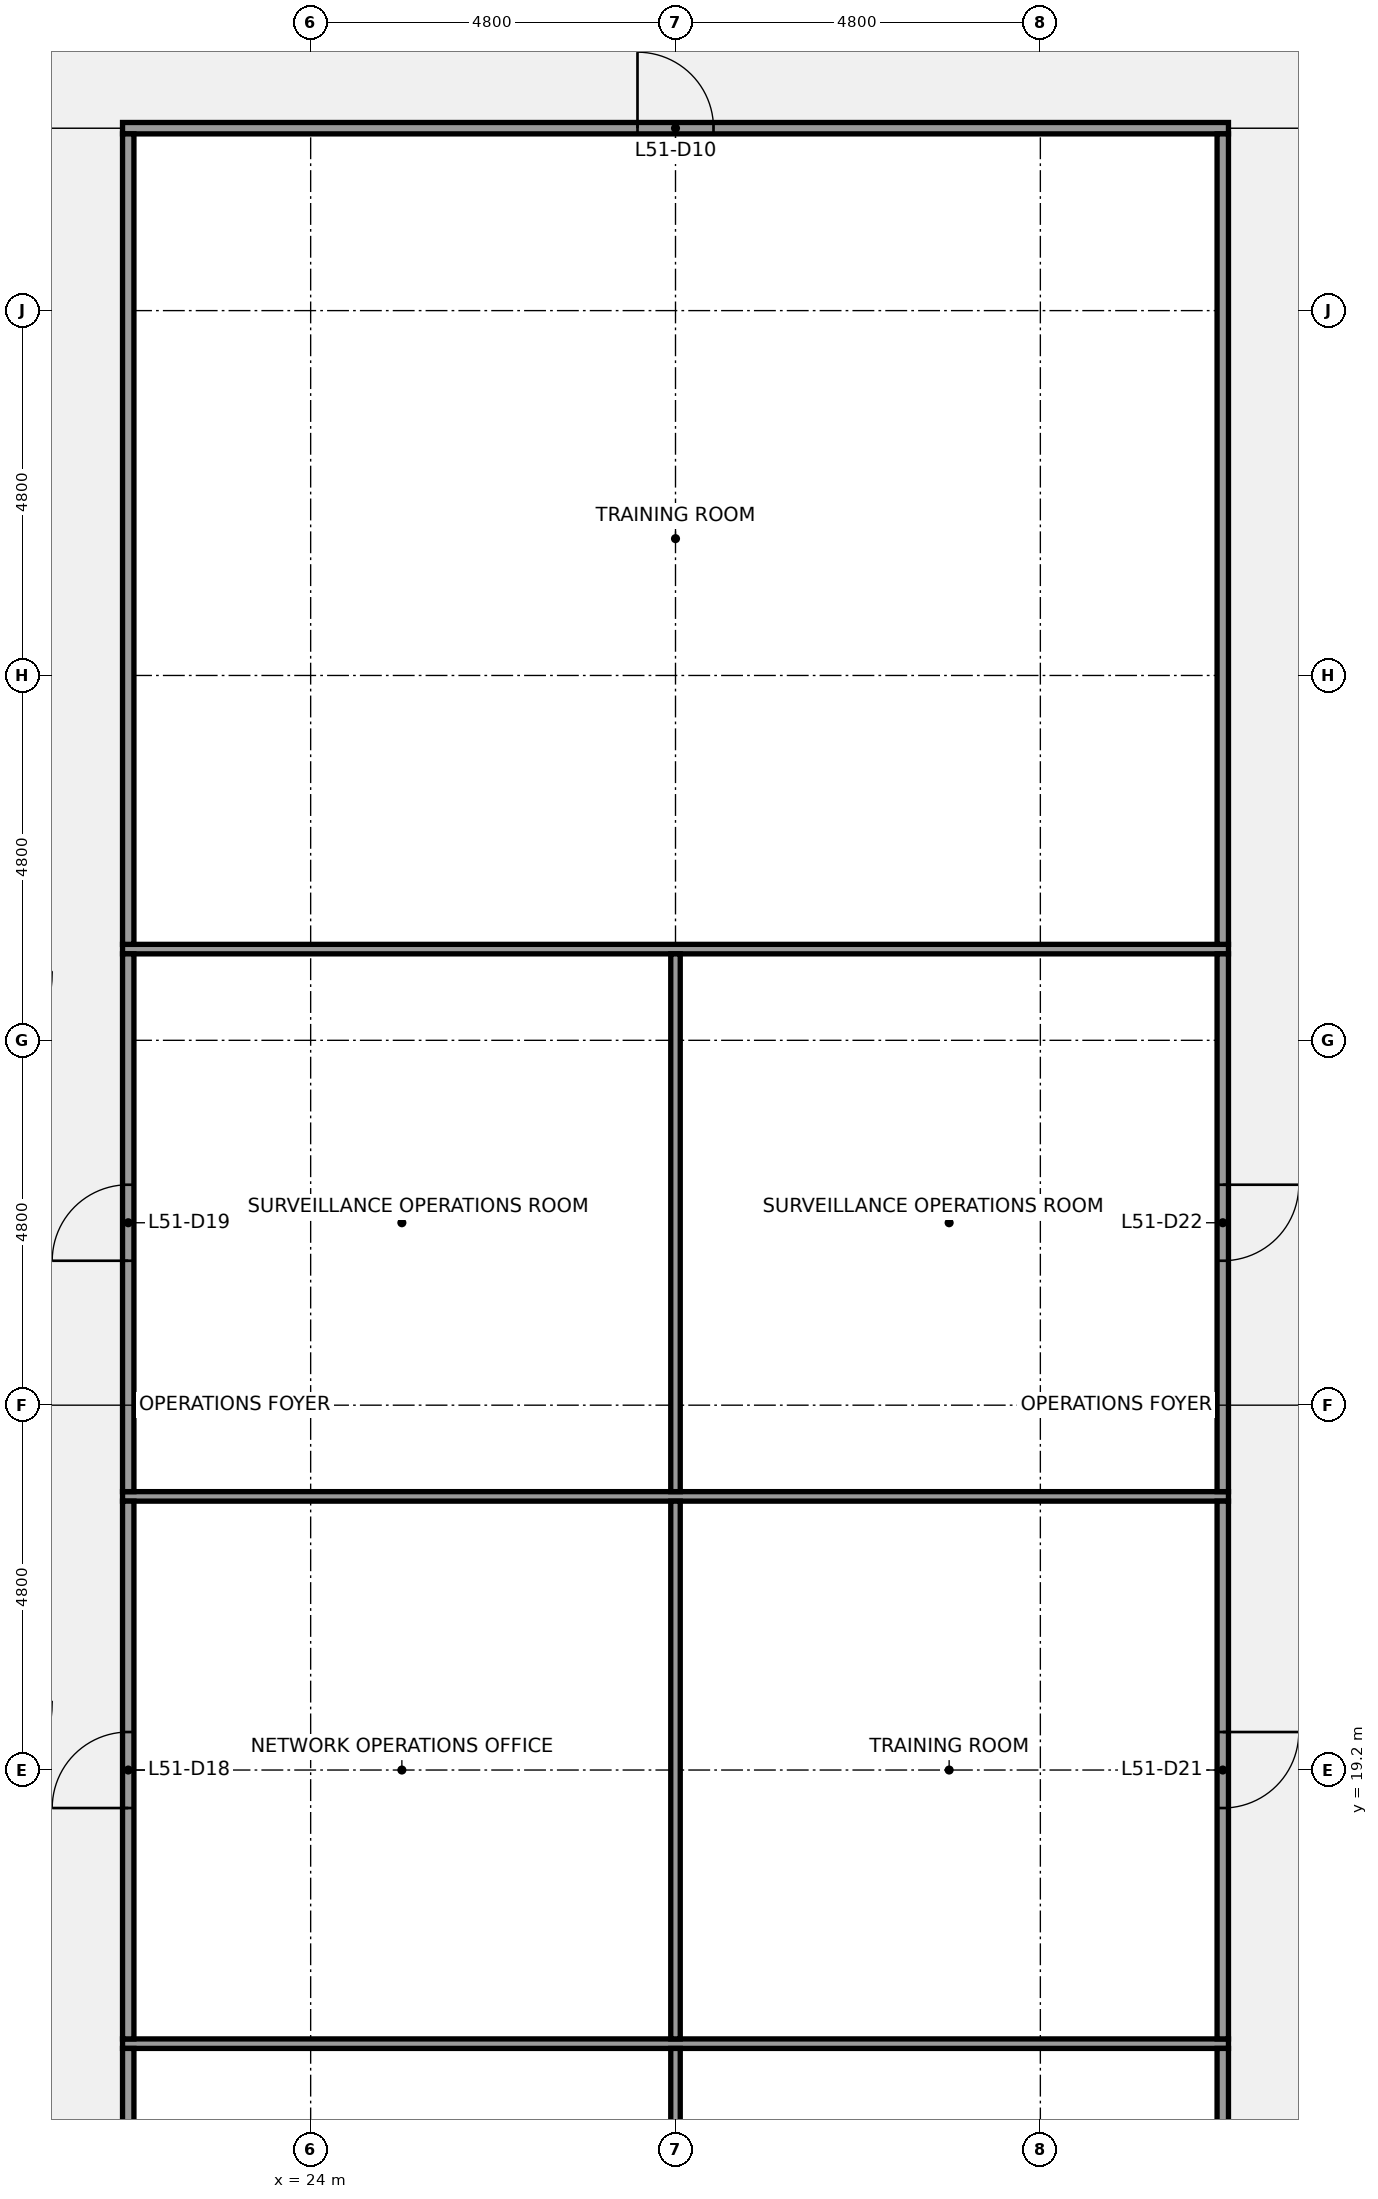
"""IFC4 building model, lengths in metres.
Left out: names, types, materials, properties, quantities, classifications, styles, units other than length and angle.
Written with IfcOpenShell. Run it as: python <this file> out.ifc"""

import sys

from ifc_helpers import new_model, si_unit, direction, frame, frame_2d, origin, place, context, subcontext, project, spatial, rectangle, extrude, element, fill, save


model = new_model("IFC4")
c1 = context("Model", 3, precision=1e-05, world=origin(), true_north=direction((0.0, 1.0)))
c2 = subcontext(c1, "Body", "Model", "MODEL_VIEW")
j1 = project(units=[si_unit("LENGTHUNIT", "METRE"), si_unit("PLANEANGLEUNIT", "RADIAN")], contexts=[c1])
p1 = place(None, origin())
s1 = spatial("IfcSite", under=j1, at=p1, CompositionType="ELEMENT")
p2 = place(p1, origin())
s2 = spatial("IfcBuilding", under=s1, at=p2, CompositionType="ELEMENT")
p3 = place(p2, frame((0.0, 0.0, 233.2)))
s3 = spatial("IfcBuildingStorey", under=s2, at=p3, CompositionType="ELEMENT", Elevation=233.2)
for number, where, z_axis, x_axis in (
    (1, (21.525, 15.6, 0.0), (0.0, 0.0, 1.0), (1.0, 0.0, 0.0)),
    (2, (21.525, 22.8, 0.0), (0.0, 0.0, 1.0), (1.0, 0.0, 0.0)),
    (3, (21.525, 30.0, 0.0), (0.0, 0.0, 1.0), (1.0, 0.0, 0.0)),
):
    element("IfcWall", number, at=place(p3, frame(where, z_axis=z_axis, x_axis=x_axis)), inside=s3, PredefinedType="PARTITIONING", context=c2, shape_type="SweptSolid", body=[
        extrude(rectangle(XDim=14.55, YDim=0.125, at=frame_2d((7.275, 0.0))), origin(), (0.0, 0.0, 1.0), 2.87),
    ])
p4 = place(p3, frame((21.525, 40.8, 0.0), z_axis=(0.0, 0.0, 1.0), x_axis=(1.0, 0.0, 0.0)))
e4 = element("IfcWall", 4, at=p4, inside=s3, PredefinedType="PARTITIONING", context=c2, shape_type="SweptSolid", body=[
    extrude(rectangle(XDim=14.55, YDim=0.15, at=frame_2d((7.275, 0.0))), origin(), (0.0, 0.0, 1.0), 2.87),
])
p5 = place(p4, frame((6.775, 0.0, 0.0)))
e5 = element("IfcOpeningElement", 5, at=p5, cuts=e4, PredefinedType="OPENING", context=c2, shape_type="SweptSolid", body=[
    extrude(rectangle(XDim=1.0, YDim=2.1, at=frame_2d((0.5, 1.05))), frame((0.0, 0.085, 0.0), z_axis=(0.0, -1.0, 0.0), x_axis=(1.0, 0.0, 0.0)), (0.0, 0.0, 1.0), 0.17),
])
p6 = place(p3, frame((21.6, 8.462, 0.0), z_axis=(0.0, 0.0, 1.0), x_axis=(0.0, 1.0, 0.0)))
e6 = element("IfcWall", 6, at=p6, inside=s3, PredefinedType="PARTITIONING", context=c2, shape_type="SweptSolid", body=[
    extrude(rectangle(XDim=7.075, YDim=0.15, at=frame_2d((3.538, 0.0))), origin(), (0.0, 0.0, 1.0), 2.87),
])
p7 = place(p6, frame((3.038, 0.0, 0.0)))
e7 = element("IfcOpeningElement", 7, at=p7, cuts=e6, PredefinedType="OPENING", context=c2, shape_type="SweptSolid", body=[
    extrude(rectangle(XDim=1.0, YDim=2.1, at=frame_2d((0.5, 1.05))), frame((0.0, 0.085, 0.0), z_axis=(0.0, -1.0, 0.0), x_axis=(1.0, 0.0, 0.0)), (0.0, 0.0, 1.0), 0.17),
])
p8 = place(p3, frame((21.6, 15.663, 0.0), z_axis=(0.0, 0.0, 1.0), x_axis=(0.0, 1.0, 0.0)))
e8 = element("IfcWall", 8, at=p8, inside=s3, PredefinedType="PARTITIONING", context=c2, shape_type="SweptSolid", body=[
    extrude(rectangle(XDim=7.075, YDim=0.15, at=frame_2d((3.538, 0.0))), origin(), (0.0, 0.0, 1.0), 2.87),
])
p9 = place(p8, frame((3.038, 0.0, 0.0)))
e9 = element("IfcOpeningElement", 9, at=p9, cuts=e8, PredefinedType="OPENING", context=c2, shape_type="SweptSolid", body=[
    extrude(rectangle(XDim=1.0, YDim=2.1, at=frame_2d((0.5, 1.05))), frame((0.0, 0.085, 0.0), z_axis=(0.0, -1.0, 0.0), x_axis=(1.0, 0.0, 0.0)), (0.0, 0.0, 1.0), 0.17),
])
p10 = place(p3, frame((21.6, 22.863, 0.0), z_axis=(0.0, 0.0, 1.0), x_axis=(0.0, 1.0, 0.0)))
e10 = element("IfcWall", 10, at=p10, inside=s3, PredefinedType="PARTITIONING", context=c2, shape_type="SweptSolid", body=[
    extrude(rectangle(XDim=7.075, YDim=0.15, at=frame_2d((3.538, 0.0))), origin(), (0.0, 0.0, 1.0), 2.87),
])
p11 = place(p10, frame((3.038, 0.0, 0.0)))
e11 = element("IfcOpeningElement", 11, at=p11, cuts=e10, PredefinedType="OPENING", context=c2, shape_type="SweptSolid", body=[
    extrude(rectangle(XDim=1.0, YDim=2.1, at=frame_2d((0.5, 1.05))), frame((0.0, 0.085, 0.0), z_axis=(0.0, -1.0, 0.0), x_axis=(1.0, 0.0, 0.0)), (0.0, 0.0, 1.0), 0.17),
])
p12 = place(p3, frame((21.6, 30.062, 0.0), z_axis=(0.0, 0.0, 1.0), x_axis=(0.0, 1.0, 0.0)))
e12 = element("IfcWall", 12, at=p12, inside=s3, PredefinedType="PARTITIONING", context=c2, shape_type="SweptSolid", body=[
    extrude(rectangle(XDim=10.663, YDim=0.15, at=frame_2d((5.331, 0.0))), origin(), (0.0, 0.0, 1.0), 2.87),
])
p13 = place(p3, frame((28.8, 8.462, 0.0), z_axis=(0.0, 0.0, 1.0), x_axis=(0.0, 1.0, 0.0)))
e13 = element("IfcWall", 13, at=p13, inside=s3, PredefinedType="PARTITIONING", context=c2, shape_type="SweptSolid", body=[
    extrude(rectangle(XDim=7.075, YDim=0.125, at=frame_2d((3.538, 0.0))), origin(), (0.0, 0.0, 1.0), 2.87),
])
for number, where, z_axis, x_axis in (
    (14, (28.8, 15.663, 0.0), (0.0, 0.0, 1.0), (0.0, 1.0, 0.0)),
    (15, (28.8, 22.863, 0.0), (0.0, 0.0, 1.0), (0.0, 1.0, 0.0)),
):
    element("IfcWall", number, at=place(p3, frame(where, z_axis=z_axis, x_axis=x_axis)), inside=s3, PredefinedType="PARTITIONING", context=c2, shape_type="SweptSolid", body=[
        extrude(rectangle(XDim=7.075, YDim=0.125, at=frame_2d((3.538, 0.0))), origin(), (0.0, 0.0, 1.0), 2.87),
    ])
p14 = place(p3, frame((36.0, 8.462, 0.0), z_axis=(0.0, 0.0, 1.0), x_axis=(0.0, 1.0, 0.0)))
e16 = element("IfcWall", 16, at=p14, inside=s3, PredefinedType="PARTITIONING", context=c2, shape_type="SweptSolid", body=[
    extrude(rectangle(XDim=7.075, YDim=0.15, at=frame_2d((3.538, 0.0))), origin(), (0.0, 0.0, 1.0), 2.87),
])
p15 = place(p14, frame((3.038, 0.0, 0.0)))
e17 = element("IfcOpeningElement", 17, at=p15, cuts=e16, PredefinedType="OPENING", context=c2, shape_type="SweptSolid", body=[
    extrude(rectangle(XDim=1.0, YDim=2.1, at=frame_2d((0.5, 1.05))), frame((0.0, 0.085, 0.0), z_axis=(0.0, -1.0, 0.0), x_axis=(1.0, 0.0, 0.0)), (0.0, 0.0, 1.0), 0.17),
])
p16 = place(p3, frame((36.0, 15.663, 0.0), z_axis=(0.0, 0.0, 1.0), x_axis=(0.0, 1.0, 0.0)))
e18 = element("IfcWall", 18, at=p16, inside=s3, PredefinedType="PARTITIONING", context=c2, shape_type="SweptSolid", body=[
    extrude(rectangle(XDim=7.075, YDim=0.15, at=frame_2d((3.538, 0.0))), origin(), (0.0, 0.0, 1.0), 2.87),
])
p17 = place(p16, frame((3.038, 0.0, 0.0)))
e19 = element("IfcOpeningElement", 19, at=p17, cuts=e18, PredefinedType="OPENING", context=c2, shape_type="SweptSolid", body=[
    extrude(rectangle(XDim=1.0, YDim=2.1, at=frame_2d((0.5, 1.05))), frame((0.0, 0.085, 0.0), z_axis=(0.0, -1.0, 0.0), x_axis=(1.0, 0.0, 0.0)), (0.0, 0.0, 1.0), 0.17),
])
p18 = place(p3, frame((36.0, 22.863, 0.0), z_axis=(0.0, 0.0, 1.0), x_axis=(0.0, 1.0, 0.0)))
e20 = element("IfcWall", 20, at=p18, inside=s3, PredefinedType="PARTITIONING", context=c2, shape_type="SweptSolid", body=[
    extrude(rectangle(XDim=7.075, YDim=0.15, at=frame_2d((3.538, 0.0))), origin(), (0.0, 0.0, 1.0), 2.87),
])
p19 = place(p18, frame((3.038, 0.0, 0.0)))
e21 = element("IfcOpeningElement", 21, at=p19, cuts=e20, PredefinedType="OPENING", context=c2, shape_type="SweptSolid", body=[
    extrude(rectangle(XDim=1.0, YDim=2.1, at=frame_2d((0.5, 1.05))), frame((0.0, 0.085, 0.0), z_axis=(0.0, -1.0, 0.0), x_axis=(1.0, 0.0, 0.0)), (0.0, 0.0, 1.0), 0.17),
])
p20 = place(p3, frame((36.0, 30.062, 0.0), z_axis=(0.0, 0.0, 1.0), x_axis=(0.0, 1.0, 0.0)))
e22 = element("IfcWall", 22, at=p20, inside=s3, PredefinedType="PARTITIONING", context=c2, shape_type="SweptSolid", body=[
    extrude(rectangle(XDim=10.663, YDim=0.15, at=frame_2d((5.331, 0.0))), origin(), (0.0, 0.0, 1.0), 2.87),
])
p21 = place(p5, origin())
e23 = element("IfcDoor", 23, at=p21, inside=s3, OperationType="SINGLE_SWING_LEFT", PredefinedType="DOOR", context=c2, shape_type="SweptSolid", body=[
    extrude(rectangle(XDim=1.0, YDim=2.1, at=frame_2d((0.5, 1.05))), frame((0.0, 0.025, 0.0), z_axis=(0.0, -1.0, 0.0), x_axis=(1.0, 0.0, 0.0)), (0.0, 0.0, 1.0), 0.05),
])
fill(e5, e23)
p22 = place(p9, origin())
e24 = element("IfcDoor", 24, at=p22, inside=s3, OperationType="SINGLE_SWING_LEFT", PredefinedType="DOOR", context=c2, shape_type="SweptSolid", body=[
    extrude(rectangle(XDim=1.0, YDim=2.1, at=frame_2d((0.5, 1.05))), frame((0.0, 0.025, 0.0), z_axis=(0.0, -1.0, 0.0), x_axis=(1.0, 0.0, 0.0)), (0.0, 0.0, 1.0), 0.05),
])
fill(e9, e24)
p23 = place(p11, origin())
e25 = element("IfcDoor", 25, at=p23, inside=s3, OperationType="SINGLE_SWING_LEFT", PredefinedType="DOOR", context=c2, shape_type="SweptSolid", body=[
    extrude(rectangle(XDim=1.0, YDim=2.1, at=frame_2d((0.5, 1.05))), frame((0.0, 0.025, 0.0), z_axis=(0.0, -1.0, 0.0), x_axis=(1.0, 0.0, 0.0)), (0.0, 0.0, 1.0), 0.05),
])
fill(e11, e25)
p24 = place(p17, origin())
e26 = element("IfcDoor", 26, at=p24, inside=s3, OperationType="SINGLE_SWING_RIGHT", PredefinedType="DOOR", context=c2, shape_type="SweptSolid", body=[
    extrude(rectangle(XDim=1.0, YDim=2.1, at=frame_2d((0.5, 1.05))), frame((0.0, 0.025, 0.0), z_axis=(0.0, -1.0, 0.0), x_axis=(1.0, 0.0, 0.0)), (0.0, 0.0, 1.0), 0.05),
])
fill(e19, e26)
p25 = place(p19, origin())
e27 = element("IfcDoor", 27, at=p25, inside=s3, OperationType="SINGLE_SWING_RIGHT", PredefinedType="DOOR", context=c2, shape_type="SweptSolid", body=[
    extrude(rectangle(XDim=1.0, YDim=2.1, at=frame_2d((0.5, 1.05))), frame((0.0, 0.025, 0.0), z_axis=(0.0, -1.0, 0.0), x_axis=(1.0, 0.0, 0.0)), (0.0, 0.0, 1.0), 0.05),
])
fill(e21, e27)
save(model, sys.argv[1])
